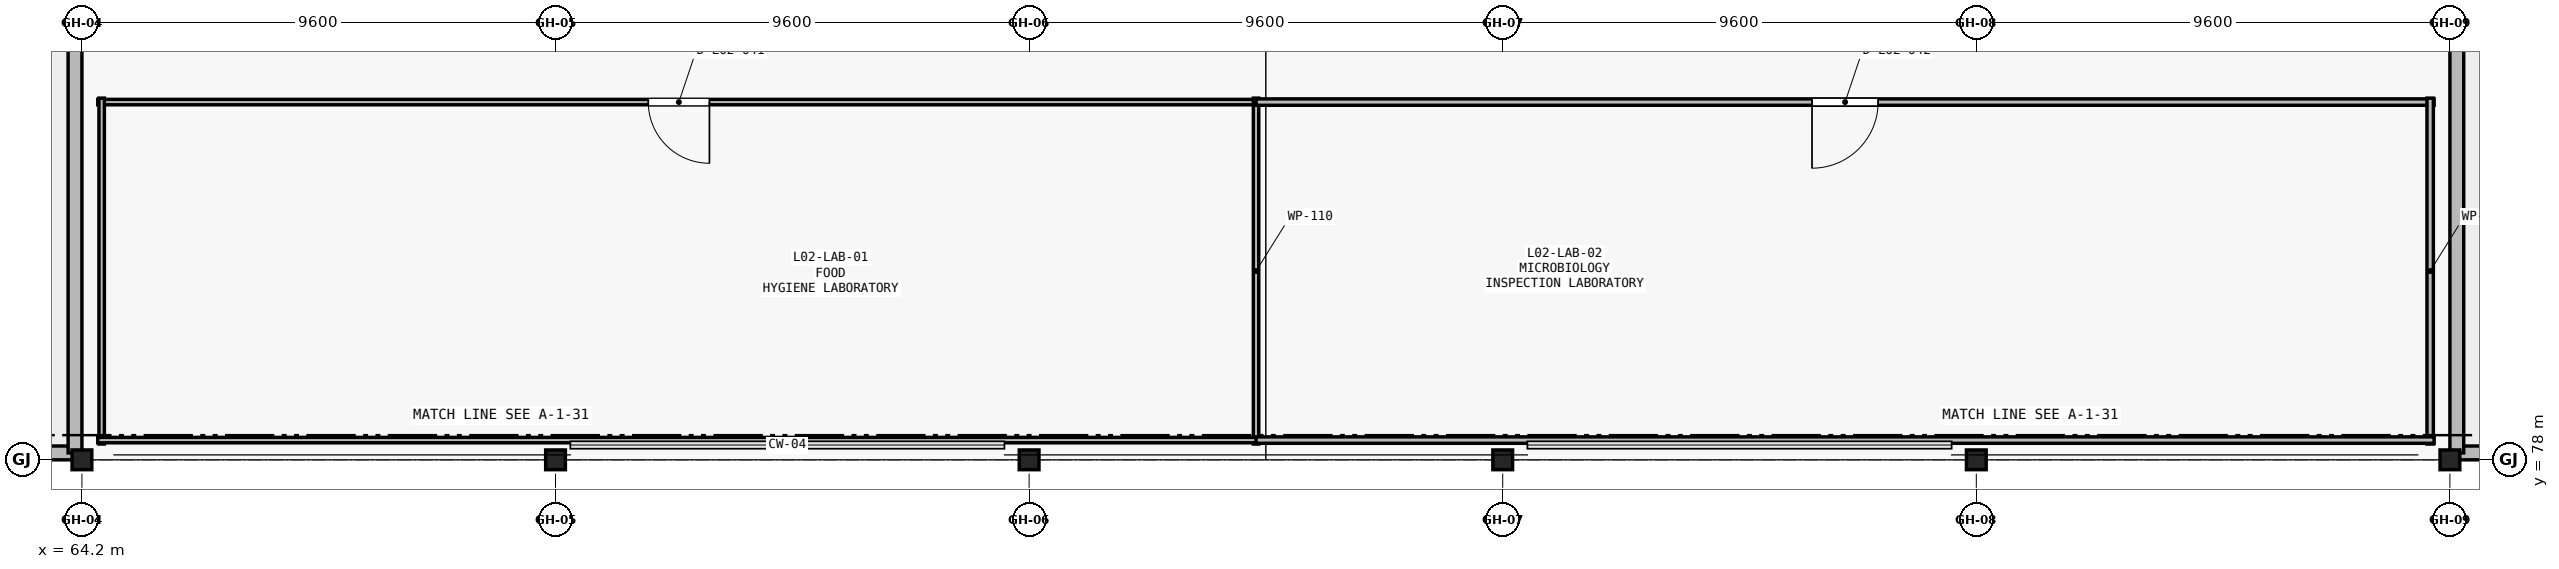
"""IFC4 building model, lengths in metres.
Left out: names, types, materials, properties, quantities, classifications, styles, units other than length and angle.
Written with IfcOpenShell. Run it as: python <this file> out.ifc"""

import sys

from ifc_helpers import new_model, si_unit, direction, frame, frame_2d, origin, origin_2d, place, context, subcontext, project, spatial, rectangle, i_section, extrude, element, fill, save


model = new_model("IFC4")
c1 = context("Model", 3, precision=1e-05, world=origin(), true_north=direction((0.0, 1.0)))
c2 = subcontext(c1, "Body", "Model", "MODEL_VIEW")
j1 = project(units=[si_unit("LENGTHUNIT", "METRE"), si_unit("PLANEANGLEUNIT", "RADIAN")], contexts=[c1])
p1 = place(None, origin())
s1 = spatial("IfcSite", under=j1, at=p1, CompositionType="ELEMENT")
p2 = place(p1, origin())
s2 = spatial("IfcBuilding", under=s1, at=p2, CompositionType="ELEMENT")
p3 = place(p2, frame((0.0, 0.0, 10.8)))
s3 = spatial("IfcBuildingStorey", under=s2, at=p3, CompositionType="ELEMENT", Elevation=10.8)
for number, where, z_axis, x_axis in (
    (1, (64.2, 78.0, 0.0), (0.0, 0.0, 1.0), (1.0, 0.0, 0.0)),
    (2, (73.8, 78.0, 0.0), (0.0, 0.0, 1.0), (1.0, 0.0, 0.0)),
    (3, (83.4, 78.0, 0.0), (0.0, 0.0, 1.0), (1.0, 0.0, 0.0)),
    (4, (93.0, 78.0, 0.0), (0.0, 0.0, 1.0), (1.0, 0.0, 0.0)),
    (5, (102.6, 78.0, 0.0), (0.0, 0.0, 1.0), (1.0, 0.0, 0.0)),
    (6, (112.2, 78.0, 0.0), (0.0, 0.0, 1.0), (1.0, 0.0, 0.0)),
):
    element("IfcColumn", number, at=place(p3, frame(where, z_axis=z_axis, x_axis=x_axis)), inside=s3, PredefinedType="COLUMN", context=c2, shape_type="SweptSolid", body=[
        extrude(i_section(OverallWidth=0.4, OverallDepth=0.4, WebThickness=0.013, FlangeThickness=0.021, FilletRadius=0.022, at=origin_2d()), origin(), (0.0, 0.0, 1.0), 4.2),
    ])
p4 = place(p3, frame((54.74, 78.14, 0.01), z_axis=(0.0, 0.0, 1.0), x_axis=(1.0, 0.0, 0.0)))
e7 = element("IfcWall", 7, at=p4, inside=s3, PredefinedType="PARAPET", context=c2, shape_type="SweptSolid", body=[
    extrude(rectangle(XDim=9.32, YDim=0.28, at=frame_2d((4.66, 0.0))), origin(), (0.0, 0.0, 1.0), 1.15),
])
p5 = place(p3, frame((64.06, 78.14, 0.01), z_axis=(0.0, 0.0, 1.0), x_axis=(0.0, 1.0, 0.0)))
e8 = element("IfcWall", 8, at=p5, inside=s3, PredefinedType="PARAPET", context=c2, shape_type="SweptSolid", body=[
    extrude(rectangle(XDim=20.12, YDim=0.28, at=frame_2d((10.06, 0.0))), origin(), (0.0, 0.0, 1.0), 1.15),
])
p6 = place(p3, frame((112.34, 78.14, 0.01), z_axis=(0.0, 0.0, 1.0), x_axis=(1.0, 0.0, 0.0)))
e9 = element("IfcWall", 9, at=p6, inside=s3, PredefinedType="PARAPET", context=c2, shape_type="SweptSolid", body=[
    extrude(rectangle(XDim=9.32, YDim=0.28, at=frame_2d((4.66, 0.0))), origin(), (0.0, 0.0, 1.0), 1.15),
])
p7 = place(p3, frame((112.34, 98.26, 0.01), z_axis=(0.0, 0.0, 1.0), x_axis=(0.0, -1.0, 0.0)))
e10 = element("IfcWall", 10, at=p7, inside=s3, PredefinedType="PARAPET", context=c2, shape_type="SweptSolid", body=[
    extrude(rectangle(XDim=20.12, YDim=0.28, at=frame_2d((10.06, 0.0))), origin(), (0.0, 0.0, 1.0), 1.15),
])
p8 = place(p3, frame((88.08, 85.25, 0.0), z_axis=(0.0, 0.0, 1.0), x_axis=(-1.0, 0.0, 0.0)))
e11 = element("IfcWall", 11, at=p8, inside=s3, PredefinedType="PARTITIONING", context=c2, shape_type="SweptSolid", body=[
    extrude(rectangle(XDim=23.56, YDim=0.11, at=frame_2d((11.78, 0.0))), origin(), (0.0, 0.0, 1.0), 3.72),
])
p9 = place(p8, frame((11.16, 0.0, 0.0)))
e12 = element("IfcOpeningElement", 12, at=p9, cuts=e11, PredefinedType="OPENING", context=c2, shape_type="SweptSolid", body=[
    extrude(rectangle(XDim=1.24, YDim=2.26, at=frame_2d((0.62, 1.13))), frame((0.0, 0.065, 0.0), z_axis=(0.0, -1.0, 0.0), x_axis=(1.0, 0.0, 0.0)), (0.0, 0.0, 1.0), 0.13),
])
for number, where, z_axis, x_axis in (
    (13, (88.0, 78.32, 0.0), (0.0, 0.0, 1.0), (0.0, 1.0, 0.0)),
    (14, (64.6, 85.33, 0.0), (0.0, 0.0, 1.0), (0.0, -1.0, 0.0)),
):
    element("IfcWall", number, at=place(p3, frame(where, z_axis=z_axis, x_axis=x_axis)), inside=s3, PredefinedType="PARTITIONING", context=c2, shape_type="SweptSolid", body=[
        extrude(rectangle(XDim=7.01, YDim=0.11, at=frame_2d((3.505, 0.0))), origin(), (0.0, 0.0, 1.0), 3.72),
    ])
p10 = place(p3, frame((64.52, 78.4, 0.0), z_axis=(0.0, 0.0, 1.0), x_axis=(1.0, 0.0, 0.0)))
e15 = element("IfcWall", 15, at=p10, inside=s3, PredefinedType="PARTITIONING", context=c2, shape_type="SweptSolid", body=[
    extrude(rectangle(XDim=23.56, YDim=0.11, at=frame_2d((11.78, 0.0))), origin(), (0.0, 0.0, 1.0), 3.72),
])
p11 = place(p3, frame((111.88, 85.25, 0.0), z_axis=(0.0, 0.0, 1.0), x_axis=(-1.0, 0.0, 0.0)))
e16 = element("IfcWall", 16, at=p11, inside=s3, PredefinedType="PARTITIONING", context=c2, shape_type="SweptSolid", body=[
    extrude(rectangle(XDim=23.88, YDim=0.13, at=frame_2d((11.94, 0.0))), origin(), (0.0, 0.0, 1.0), 3.72),
])
p12 = place(p11, frame((11.27, 0.0, 0.0)))
e17 = element("IfcOpeningElement", 17, at=p12, cuts=e16, PredefinedType="OPENING", context=c2, shape_type="SweptSolid", body=[
    extrude(rectangle(XDim=1.34, YDim=2.26, at=frame_2d((0.67, 1.13))), frame((0.0, 0.075, 0.0), z_axis=(0.0, -1.0, 0.0), x_axis=(1.0, 0.0, 0.0)), (0.0, 0.0, 1.0), 0.15),
])
p13 = place(p3, frame((111.8, 78.32, 0.0), z_axis=(0.0, 0.0, 1.0), x_axis=(0.0, 1.0, 0.0)))
e18 = element("IfcWall", 18, at=p13, inside=s3, PredefinedType="PARTITIONING", context=c2, shape_type="SweptSolid", body=[
    extrude(rectangle(XDim=7.01, YDim=0.13, at=frame_2d((3.505, 0.0))), origin(), (0.0, 0.0, 1.0), 3.72),
])
p14 = place(p3, frame((88.0, 78.4, 0.0), z_axis=(0.0, 0.0, 1.0), x_axis=(1.0, 0.0, 0.0)))
e19 = element("IfcWall", 19, at=p14, inside=s3, PredefinedType="PARTITIONING", context=c2, shape_type="SweptSolid", body=[
    extrude(rectangle(XDim=23.88, YDim=0.13, at=frame_2d((11.94, 0.0))), origin(), (0.0, 0.0, 1.0), 3.72),
])
p15 = place(p9, origin())
e20 = element("IfcDoor", 20, at=p15, inside=s3, OperationType="SINGLE_SWING_LEFT", PredefinedType="DOOR", context=c2, shape_type="SweptSolid", body=[
    extrude(rectangle(XDim=1.24, YDim=2.26, at=frame_2d((0.62, 1.13))), frame((0.0, 0.025, 0.0), z_axis=(0.0, -1.0, 0.0), x_axis=(1.0, 0.0, 0.0)), (0.0, 0.0, 1.0), 0.05),
])
fill(e12, e20)
p16 = place(p12, origin())
e21 = element("IfcDoor", 21, at=p16, inside=s3, OperationType="SINGLE_SWING_RIGHT", PredefinedType="DOOR", context=c2, shape_type="SweptSolid", body=[
    extrude(rectangle(XDim=1.34, YDim=2.26, at=frame_2d((0.67, 1.13))), frame((0.0, 0.025, 0.0), z_axis=(0.0, -1.0, 0.0), x_axis=(1.0, 0.0, 0.0)), (0.0, 0.0, 1.0), 0.05),
])
fill(e17, e21)
save(model, sys.argv[1])
